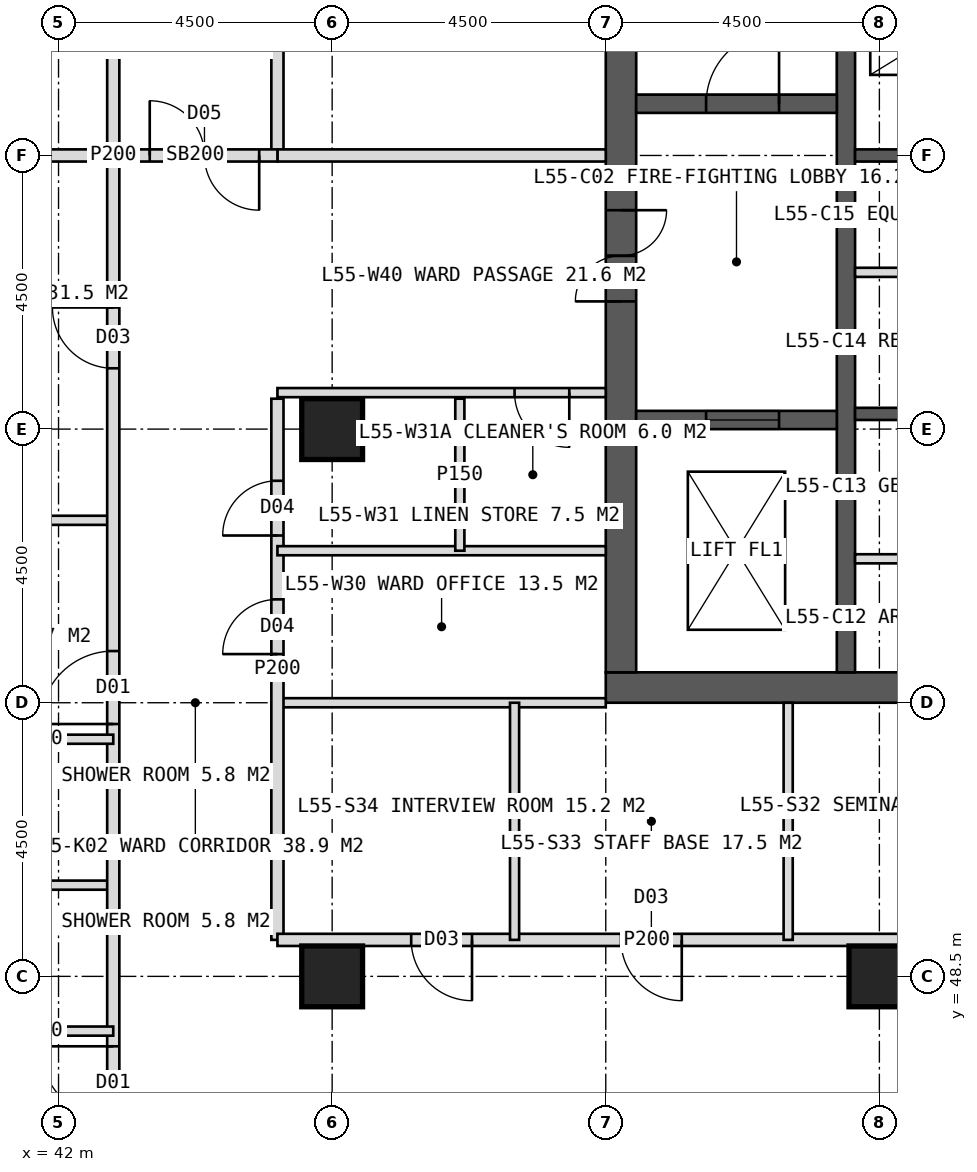
"""IFC4 building model, lengths in metres.
Left out: names, types, materials, properties, quantities, classifications, styles, units other than length and angle.
Written with IfcOpenShell. Run it as: python <this file> out.ifc"""

import sys

from ifc_helpers import new_model, si_unit, direction, frame, frame_2d, origin, origin_2d, place, context, subcontext, project, spatial, rectangle, hollow_rectangle, extrude, element, fill, save


model = new_model("IFC4")
c1 = context("Model", 3, precision=1e-05, world=origin(), true_north=direction((0.0, 1.0)))
c2 = subcontext(c1, "Body", "Model", "MODEL_VIEW")
j1 = project(units=[si_unit("LENGTHUNIT", "METRE"), si_unit("PLANEANGLEUNIT", "RADIAN")], contexts=[c1])
p1 = place(None, origin())
s1 = spatial("IfcSite", under=j1, at=p1, CompositionType="ELEMENT")
p2 = place(p1, origin())
s2 = spatial("IfcBuilding", under=s1, at=p2, CompositionType="ELEMENT")
p3 = place(p2, frame((0.0, 0.0, 229.0)))
s3 = spatial("IfcBuildingStorey", under=s2, at=p3, CompositionType="ELEMENT", Elevation=229.0)
p4 = place(p3, frame((51.0, 53.25, 0.0), z_axis=(0.0, 0.0, 1.0), x_axis=(1.0, 0.0, 0.0)))
e1 = element("IfcWall", 1, at=p4, inside=s3, PredefinedType="SHEAR", context=c2, shape_type="SweptSolid", body=[
    extrude(rectangle(XDim=18.0, YDim=0.5, at=frame_2d((9.0, 0.0))), origin(), (0.0, 0.0, 1.0), 4.0),
])
p5 = place(p4, frame((8.1, 0.0, 0.0)))
e2 = element("IfcOpeningElement", 2, at=p5, cuts=e1, PredefinedType="OPENING", context=c2, shape_type="SweptSolid", body=[
    extrude(rectangle(XDim=1.8, YDim=2.2, at=frame_2d((0.9, 1.1))), frame((0.0, 0.26, 0.0), z_axis=(0.0, -1.0, 0.0), x_axis=(1.0, 0.0, 0.0)), (0.0, 0.0, 1.0), 0.52),
])
p6 = place(p3, frame((51.25, 53.5, 0.0), z_axis=(0.0, 0.0, 1.0), x_axis=(0.0, 1.0, 0.0)))
e3 = element("IfcWall", 3, at=p6, inside=s3, PredefinedType="SHEAR", context=c2, shape_type="SweptSolid", body=[
    extrude(rectangle(XDim=17.0, YDim=0.5, at=frame_2d((8.5, 0.0))), origin(), (0.0, 0.0, 1.0), 4.0),
])
p7 = place(p6, frame((6.1, 0.0, 0.0)))
e4 = element("IfcOpeningElement", 4, at=p7, cuts=e3, PredefinedType="OPENING", context=c2, shape_type="SweptSolid", body=[
    extrude(rectangle(XDim=1.5, YDim=2.2, at=frame_2d((0.75, 1.1))), frame((0.0, 0.26, 0.0), z_axis=(0.0, -1.0, 0.0), x_axis=(1.0, 0.0, 0.0)), (0.0, 0.0, 1.0), 0.52),
])
p8 = place(p3, frame((54.95, 53.5, 0.0), z_axis=(0.0, 0.0, 1.0), x_axis=(0.0, 1.0, 0.0)))
e5 = element("IfcWall", 5, at=p8, inside=s3, PredefinedType="SHEAR", context=c2, shape_type="SweptSolid", body=[
    extrude(rectangle(XDim=17.0, YDim=0.3, at=frame_2d((8.5, 0.0))), origin(), (0.0, 0.0, 1.0), 4.0),
])
for number, where, z_axis, x_axis in (
    (6, (55.1, 57.75, 0.0), (0.0, 0.0, 1.0), (1.0, 0.0, 0.0)),
    (7, (55.1, 62.0, 0.0), (0.0, 0.0, 1.0), (1.0, 0.0, 0.0)),
):
    element("IfcWall", number, at=place(p3, frame(where, z_axis=z_axis, x_axis=x_axis)), inside=s3, PredefinedType="SHEAR", context=c2, shape_type="SweptSolid", body=[
        extrude(rectangle(XDim=3.05, YDim=0.2, at=frame_2d((1.525, 0.0))), origin(), (0.0, 0.0, 1.0), 4.0),
    ])
p9 = place(p3, frame((51.5, 62.85, 0.0), z_axis=(0.0, 0.0, 1.0), x_axis=(1.0, 0.0, 0.0)))
e8 = element("IfcWall", 8, at=p9, inside=s3, PredefinedType="SHEAR", context=c2, shape_type="SweptSolid", body=[
    extrude(rectangle(XDim=3.3, YDim=0.3, at=frame_2d((1.65, 0.0))), origin(), (0.0, 0.0, 1.0), 4.0),
])
p10 = place(p9, frame((1.15, 0.0, 0.0)))
e9 = element("IfcOpeningElement", 9, at=p10, cuts=e8, PredefinedType="OPENING", context=c2, shape_type="SweptSolid", body=[
    extrude(rectangle(XDim=1.2, YDim=2.1, at=frame_2d((0.6, 1.05))), frame((0.0, 0.16, 0.0), z_axis=(0.0, -1.0, 0.0), x_axis=(1.0, 0.0, 0.0)), (0.0, 0.0, 1.0), 0.32),
])
p11 = place(p3, frame((51.5, 57.65, 0.0), z_axis=(0.0, 0.0, 1.0), x_axis=(1.0, 0.0, 0.0)))
e10 = element("IfcWall", 10, at=p11, inside=s3, PredefinedType="SHEAR", context=c2, shape_type="SweptSolid", body=[
    extrude(rectangle(XDim=3.3, YDim=0.3, at=frame_2d((1.65, 0.0))), origin(), (0.0, 0.0, 1.0), 4.0),
])
p12 = place(p11, frame((1.15, 0.0, 0.0)))
e11 = element("IfcOpeningElement", 11, at=p12, cuts=e10, PredefinedType="OPENING", context=c2, shape_type="SweptSolid", body=[
    extrude(rectangle(XDim=1.2, YDim=2.2, at=frame_2d((0.6, 1.1))), frame((0.0, 0.16, 0.0), z_axis=(0.0, -1.0, 0.0), x_axis=(1.0, 0.0, 0.0)), (0.0, 0.0, 1.0), 0.32),
])
for number, where, z_axis, x_axis in (
    (12, (46.5, 48.5, 0.0), (0.0, 0.0, 1.0), (1.0, 0.0, 0.0)),
    (13, (55.5, 48.5, 0.0), (0.0, 0.0, 1.0), (1.0, 0.0, 0.0)),
    (14, (46.5, 57.5, 0.0), (0.0, 0.0, 1.0), (1.0, 0.0, 0.0)),
):
    element("IfcColumn", number, at=place(p3, frame(where, z_axis=z_axis, x_axis=x_axis)), inside=s3, PredefinedType="COLUMN", context=c2, shape_type="SweptSolid", body=[
        extrude(hollow_rectangle(XDim=1.0, YDim=1.0, WallThickness=0.1, at=origin_2d()), origin(), (0.0, 0.0, 1.0), 4.0),
    ])
for number, where, z_axis, x_axis in (
    (15, (42.9, 50.0, 0.0), (0.0, 0.0, 1.0), (-1.0, 0.0, 0.0)),
    (16, (42.9, 56.0, 0.0), (0.0, 0.0, 1.0), (-1.0, 0.0, 0.0)),
):
    element("IfcWall", number, at=place(p3, frame(where, z_axis=z_axis, x_axis=x_axis)), inside=s3, PredefinedType="PARTITIONING", context=c2, shape_type="SweptSolid", body=[
        extrude(rectangle(XDim=5.25, YDim=0.15, at=frame_2d((2.625, 0.0))), origin(), (0.0, 0.0, 1.0), 3.75),
    ])
p13 = place(p3, frame((42.9, 62.0, 0.0), z_axis=(0.0, 0.0, 1.0), x_axis=(-1.0, 0.0, 0.0)))
e17 = element("IfcWall", 17, at=p13, inside=s3, PredefinedType="SOLIDWALL", context=c2, shape_type="SweptSolid", body=[
    extrude(rectangle(XDim=5.25, YDim=0.2, at=frame_2d((2.625, 0.0))), origin(), (0.0, 0.0, 1.0), 2.95),
])
p14 = place(p3, frame((42.9, 44.9, 0.0), z_axis=(0.0, 0.0, 1.0), x_axis=(0.0, 1.0, 0.0)))
e18 = element("IfcWall", 18, at=p14, inside=s3, PredefinedType="PARTITIONING", context=c2, shape_type="SweptSolid", body=[
    extrude(rectangle(XDim=34.2, YDim=0.2, at=frame_2d((17.1, 0.0))), origin(), (0.0, 0.0, 1.0), 3.75),
])
p15 = place(p14, frame((1.25, 0.0, 0.0)))
e19 = element("IfcOpeningElement", 19, at=p15, cuts=e18, PredefinedType="OPENING", context=c2, shape_type="SweptSolid", body=[
    extrude(rectangle(XDim=1.2, YDim=2.2, at=frame_2d((0.6, 1.1))), frame((0.0, 0.11, 0.0), z_axis=(0.0, -1.0, 0.0), x_axis=(1.0, 0.0, 0.0)), (0.0, 0.0, 1.0), 0.22),
])
p16 = place(p14, frame((7.75, 0.0, 0.0)))
e20 = element("IfcOpeningElement", 20, at=p16, cuts=e18, PredefinedType="OPENING", context=c2, shape_type="SweptSolid", body=[
    extrude(rectangle(XDim=1.2, YDim=2.2, at=frame_2d((0.6, 1.1))), frame((0.0, 0.11, 0.0), z_axis=(0.0, -1.0, 0.0), x_axis=(1.0, 0.0, 0.0)), (0.0, 0.0, 1.0), 0.22),
])
p17 = place(p14, frame((13.6, 0.0, 0.0)))
e21 = element("IfcOpeningElement", 21, at=p17, cuts=e18, PredefinedType="OPENING", context=c2, shape_type="SweptSolid", body=[
    extrude(rectangle(XDim=1.0, YDim=2.1, at=frame_2d((0.5, 1.05))), frame((0.0, 0.11, 0.0), z_axis=(0.0, -1.0, 0.0), x_axis=(1.0, 0.0, 0.0)), (0.0, 0.0, 1.0), 0.22),
])
p18 = place(p14, frame((19.75, 0.0, 0.0)))
e22 = element("IfcOpeningElement", 22, at=p18, cuts=e18, PredefinedType="OPENING", context=c2, shape_type="SweptSolid", body=[
    extrude(rectangle(XDim=1.2, YDim=2.2, at=frame_2d((0.6, 1.1))), frame((0.0, 0.11, 0.0), z_axis=(0.0, -1.0, 0.0), x_axis=(1.0, 0.0, 0.0)), (0.0, 0.0, 1.0), 0.22),
])
p19 = place(p14, frame((30.35, 0.0, 0.0)))
e23 = element("IfcOpeningElement", 23, at=p19, cuts=e18, PredefinedType="OPENING", context=c2, shape_type="SweptSolid", body=[
    extrude(rectangle(XDim=1.2, YDim=2.2, at=frame_2d((0.6, 1.1))), frame((0.0, 0.11, 0.0), z_axis=(0.0, -1.0, 0.0), x_axis=(1.0, 0.0, 0.0)), (0.0, 0.0, 1.0), 0.22),
])
for number, where, z_axis, x_axis in (
    (24, (42.9, 47.6, 0.0), (0.0, 0.0, 1.0), (-1.0, 0.0, 0.0)),
    (25, (42.9, 52.4, 0.0), (0.0, 0.0, 1.0), (-1.0, 0.0, 0.0)),
):
    element("IfcWall", number, at=place(p3, frame(where, z_axis=z_axis, x_axis=x_axis)), inside=s3, PredefinedType="PARTITIONING", context=c2, shape_type="SweptSolid", body=[
        extrude(rectangle(XDim=2.4, YDim=0.15, at=frame_2d((1.2, 0.0))), origin(), (0.0, 0.0, 1.0), 3.75),
    ])
p20 = place(p3, frame((51.0, 53.0, 0.0), z_axis=(0.0, 0.0, 1.0), x_axis=(-1.0, 0.0, 0.0)))
e26 = element("IfcWall", 26, at=p20, inside=s3, PredefinedType="PARTITIONING", context=c2, shape_type="SweptSolid", body=[
    extrude(rectangle(XDim=5.4, YDim=0.15, at=frame_2d((2.7, 0.0))), origin(), (0.0, 0.0, 1.0), 3.75),
])
p21 = place(p3, frame((45.6, 49.1, 0.0), z_axis=(0.0, 0.0, 1.0), x_axis=(0.0, 1.0, 0.0)))
e27 = element("IfcWall", 27, at=p21, inside=s3, PredefinedType="PARTITIONING", context=c2, shape_type="SweptSolid", body=[
    extrude(rectangle(XDim=8.9, YDim=0.2, at=frame_2d((4.45, 0.0))), origin(), (0.0, 0.0, 1.0), 3.75),
])
p22 = place(p21, frame((4.7, 0.0, 0.0)))
e28 = element("IfcOpeningElement", 28, at=p22, cuts=e27, PredefinedType="OPENING", context=c2, shape_type="SweptSolid", body=[
    extrude(rectangle(XDim=0.9, YDim=2.1, at=frame_2d((0.45, 1.05))), frame((0.0, 0.11, 0.0), z_axis=(0.0, -1.0, 0.0), x_axis=(1.0, 0.0, 0.0)), (0.0, 0.0, 1.0), 0.22),
])
p23 = place(p21, frame((6.65, 0.0, 0.0)))
e29 = element("IfcOpeningElement", 29, at=p23, cuts=e27, PredefinedType="OPENING", context=c2, shape_type="SweptSolid", body=[
    extrude(rectangle(XDim=0.9, YDim=2.1, at=frame_2d((0.45, 1.05))), frame((0.0, 0.11, 0.0), z_axis=(0.0, -1.0, 0.0), x_axis=(1.0, 0.0, 0.0)), (0.0, 0.0, 1.0), 0.22),
])
p24 = place(p3, frame((45.6, 62.0, 0.0), z_axis=(0.0, 0.0, 1.0), x_axis=(0.0, 1.0, 0.0)))
e30 = element("IfcWall", 30, at=p24, inside=s3, PredefinedType="PARTITIONING", context=c2, shape_type="SweptSolid", body=[
    extrude(rectangle(XDim=14.4, YDim=0.2, at=frame_2d((7.2, 0.0))), origin(), (0.0, 0.0, 1.0), 3.75),
])
p25 = place(p24, frame((2.5, 0.0, 0.0)))
e31 = element("IfcOpeningElement", 31, at=p25, cuts=e30, PredefinedType="OPENING", context=c2, shape_type="SweptSolid", body=[
    extrude(rectangle(XDim=1.0, YDim=2.1, at=frame_2d((0.5, 1.05))), frame((0.0, 0.11, 0.0), z_axis=(0.0, -1.0, 0.0), x_axis=(1.0, 0.0, 0.0)), (0.0, 0.0, 1.0), 0.22),
])
p26 = place(p24, frame((7.0, 0.0, 0.0)))
e32 = element("IfcOpeningElement", 32, at=p26, cuts=e30, PredefinedType="OPENING", context=c2, shape_type="SweptSolid", body=[
    extrude(rectangle(XDim=1.0, YDim=2.1, at=frame_2d((0.5, 1.05))), frame((0.0, 0.11, 0.0), z_axis=(0.0, -1.0, 0.0), x_axis=(1.0, 0.0, 0.0)), (0.0, 0.0, 1.0), 0.22),
])
p27 = place(p24, frame((11.2, 0.0, 0.0)))
e33 = element("IfcOpeningElement", 33, at=p27, cuts=e30, PredefinedType="OPENING", context=c2, shape_type="SweptSolid", body=[
    extrude(rectangle(XDim=1.0, YDim=2.1, at=frame_2d((0.5, 1.05))), frame((0.0, 0.11, 0.0), z_axis=(0.0, -1.0, 0.0), x_axis=(1.0, 0.0, 0.0)), (0.0, 0.0, 1.0), 0.22),
])
p28 = place(p3, frame((51.0, 58.1, 0.0), z_axis=(0.0, 0.0, 1.0), x_axis=(-1.0, 0.0, 0.0)))
e34 = element("IfcWall", 34, at=p28, inside=s3, PredefinedType="PARTITIONING", context=c2, shape_type="SweptSolid", body=[
    extrude(rectangle(XDim=5.4, YDim=0.15, at=frame_2d((2.7, 0.0))), origin(), (0.0, 0.0, 1.0), 3.75),
])
p29 = place(p28, frame((0.6, 0.0, 0.0)))
e35 = element("IfcOpeningElement", 35, at=p29, cuts=e34, PredefinedType="OPENING", context=c2, shape_type="SweptSolid", body=[
    extrude(rectangle(XDim=0.9, YDim=2.1, at=frame_2d((0.45, 1.05))), frame((0.0, 0.085, 0.0), z_axis=(0.0, -1.0, 0.0), x_axis=(1.0, 0.0, 0.0)), (0.0, 0.0, 1.0), 0.17),
])
p30 = place(p3, frame((51.0, 62.0, 0.0), z_axis=(0.0, 0.0, 1.0), x_axis=(-1.0, 0.0, 0.0)))
e36 = element("IfcWall", 36, at=p30, inside=s3, PredefinedType="SOLIDWALL", context=c2, shape_type="SweptSolid", body=[
    extrude(rectangle(XDim=5.4, YDim=0.2, at=frame_2d((2.7, 0.0))), origin(), (0.0, 0.0, 1.0), 2.95),
])
p31 = place(p3, frame((51.0, 55.5, 0.0), z_axis=(0.0, 0.0, 1.0), x_axis=(-1.0, 0.0, 0.0)))
e37 = element("IfcWall", 37, at=p31, inside=s3, PredefinedType="PARTITIONING", context=c2, shape_type="SweptSolid", body=[
    extrude(rectangle(XDim=5.4, YDim=0.15, at=frame_2d((2.7, 0.0))), origin(), (0.0, 0.0, 1.0), 3.75),
])
p32 = place(p3, frame((48.6, 55.5, 0.0), z_axis=(0.0, 0.0, 1.0), x_axis=(0.0, 1.0, 0.0)))
e38 = element("IfcWall", 38, at=p32, inside=s3, PredefinedType="PARTITIONING", context=c2, shape_type="SweptSolid", body=[
    extrude(rectangle(XDim=2.5, YDim=0.15, at=frame_2d((1.25, 0.0))), origin(), (0.0, 0.0, 1.0), 3.75),
])
p33 = place(p3, frame((57.75, 49.1, 0.0), z_axis=(0.0, 0.0, 1.0), x_axis=(-1.0, 0.0, 0.0)))
e39 = element("IfcWall", 39, at=p33, inside=s3, PredefinedType="PARTITIONING", context=c2, shape_type="SweptSolid", body=[
    extrude(rectangle(XDim=12.15, YDim=0.2, at=frame_2d((6.075, 0.0))), origin(), (0.0, 0.0, 1.0), 3.75),
])
p34 = place(p33, frame((0.325, 0.0, 0.0)))
e40 = element("IfcOpeningElement", 40, at=p34, cuts=e39, PredefinedType="OPENING", context=c2, shape_type="SweptSolid", body=[
    extrude(rectangle(XDim=1.0, YDim=2.1, at=frame_2d((0.5, 1.05))), frame((0.0, 0.11, 0.0), z_axis=(0.0, -1.0, 0.0), x_axis=(1.0, 0.0, 0.0)), (0.0, 0.0, 1.0), 0.22),
])
p35 = place(p33, frame((5.5, 0.0, 0.0)))
e41 = element("IfcOpeningElement", 41, at=p35, cuts=e39, PredefinedType="OPENING", context=c2, shape_type="SweptSolid", body=[
    extrude(rectangle(XDim=1.0, YDim=2.1, at=frame_2d((0.5, 1.05))), frame((0.0, 0.11, 0.0), z_axis=(0.0, -1.0, 0.0), x_axis=(1.0, 0.0, 0.0)), (0.0, 0.0, 1.0), 0.22),
])
p36 = place(p33, frame((8.95, 0.0, 0.0)))
e42 = element("IfcOpeningElement", 42, at=p36, cuts=e39, PredefinedType="OPENING", context=c2, shape_type="SweptSolid", body=[
    extrude(rectangle(XDim=1.0, YDim=2.1, at=frame_2d((0.5, 1.05))), frame((0.0, 0.11, 0.0), z_axis=(0.0, -1.0, 0.0), x_axis=(1.0, 0.0, 0.0)), (0.0, 0.0, 1.0), 0.22),
])
for number, where, z_axis, x_axis in (
    (43, (54.0, 53.0, 0.0), (0.0, 0.0, 1.0), (0.0, -1.0, 0.0)),
    (44, (49.5, 53.0, 0.0), (0.0, 0.0, 1.0), (0.0, -1.0, 0.0)),
):
    element("IfcWall", number, at=place(p3, frame(where, z_axis=z_axis, x_axis=x_axis)), inside=s3, PredefinedType="PARTITIONING", context=c2, shape_type="SweptSolid", body=[
        extrude(rectangle(XDim=3.9, YDim=0.15, at=frame_2d((1.95, 0.0))), origin(), (0.0, 0.0, 1.0), 3.75),
    ])
p37 = place(p3, frame((45.6, 62.0, 0.0), z_axis=(0.0, 0.0, 1.0), x_axis=(-1.0, 0.0, 0.0)))
e45 = element("IfcWall", 45, at=p37, inside=s3, PredefinedType="SOLIDWALL", context=c2, shape_type="SweptSolid", body=[
    extrude(rectangle(XDim=2.7, YDim=0.2, at=frame_2d((1.35, 0.0))), origin(), (0.0, 0.0, 1.0), 2.95),
])
p38 = place(p37, frame((0.3, 0.0, 0.0)))
e46 = element("IfcOpeningElement", 46, at=p38, cuts=e45, PredefinedType="OPENING", context=c2, shape_type="SweptSolid", body=[
    extrude(rectangle(XDim=1.8, YDim=2.2, at=frame_2d((0.9, 1.1))), frame((0.0, 0.11, 0.0), z_axis=(0.0, -1.0, 0.0), x_axis=(1.0, 0.0, 0.0)), (0.0, 0.0, 1.0), 0.22),
])
for number, where, z_axis, x_axis in (
    (47, (55.1, 55.367, 0.0), (0.0, 0.0, 1.0), (1.0, 0.0, 0.0)),
    (48, (55.1, 60.078, 0.0), (0.0, 0.0, 1.0), (1.0, 0.0, 0.0)),
):
    element("IfcWall", number, at=place(p3, frame(where, z_axis=z_axis, x_axis=x_axis)), inside=s3, PredefinedType="PARTITIONING", context=c2, shape_type="SweptSolid", body=[
        extrude(rectangle(XDim=3.05, YDim=0.15, at=frame_2d((1.525, 0.0))), origin(), (0.0, 0.0, 1.0), 3.75),
    ])
p39 = place(p15, origin())
e49 = element("IfcDoor", 49, at=p39, inside=s3, OperationType="SINGLE_SWING_RIGHT", PredefinedType="DOOR", context=c2, shape_type="SweptSolid", body=[
    extrude(rectangle(XDim=1.2, YDim=2.2, at=frame_2d((0.6, 1.1))), frame((0.0, 0.025, 0.0), z_axis=(0.0, -1.0, 0.0), x_axis=(1.0, 0.0, 0.0)), (0.0, 0.0, 1.0), 0.05),
])
fill(e19, e49)
p40 = place(p16, origin())
e50 = element("IfcDoor", 50, at=p40, inside=s3, OperationType="SINGLE_SWING_LEFT", PredefinedType="DOOR", context=c2, shape_type="SweptSolid", body=[
    extrude(rectangle(XDim=1.2, YDim=2.2, at=frame_2d((0.6, 1.1))), frame((0.0, 0.025, 0.0), z_axis=(0.0, -1.0, 0.0), x_axis=(1.0, 0.0, 0.0)), (0.0, 0.0, 1.0), 0.05),
])
fill(e20, e50)
p41 = place(p17, origin())
e51 = element("IfcDoor", 51, at=p41, inside=s3, OperationType="SINGLE_SWING_RIGHT", PredefinedType="DOOR", context=c2, shape_type="SweptSolid", body=[
    extrude(rectangle(XDim=1.0, YDim=2.1, at=frame_2d((0.5, 1.05))), frame((0.0, 0.025, 0.0), z_axis=(0.0, -1.0, 0.0), x_axis=(1.0, 0.0, 0.0)), (0.0, 0.0, 1.0), 0.05),
])
fill(e21, e51)
p42 = place(p22, origin())
e52 = element("IfcDoor", 52, at=p42, inside=s3, OperationType="SINGLE_SWING_LEFT", PredefinedType="DOOR", context=c2, shape_type="SweptSolid", body=[
    extrude(rectangle(XDim=0.9, YDim=2.1, at=frame_2d((0.45, 1.05))), frame((0.0, 0.025, 0.0), z_axis=(0.0, -1.0, 0.0), x_axis=(1.0, 0.0, 0.0)), (0.0, 0.0, 1.0), 0.05),
])
fill(e28, e52)
p43 = place(p29, origin())
e53 = element("IfcDoor", 53, at=p43, inside=s3, OperationType="SINGLE_SWING_LEFT", PredefinedType="DOOR", context=c2, shape_type="SweptSolid", body=[
    extrude(rectangle(XDim=0.9, YDim=2.1, at=frame_2d((0.45, 1.05))), frame((0.0, 0.025, 0.0), z_axis=(0.0, -1.0, 0.0), x_axis=(1.0, 0.0, 0.0)), (0.0, 0.0, 1.0), 0.05),
])
fill(e35, e53)
p44 = place(p23, origin())
e54 = element("IfcDoor", 54, at=p44, inside=s3, OperationType="SINGLE_SWING_LEFT", PredefinedType="DOOR", context=c2, shape_type="SweptSolid", body=[
    extrude(rectangle(XDim=0.9, YDim=2.1, at=frame_2d((0.45, 1.05))), frame((0.0, 0.025, 0.0), z_axis=(0.0, -1.0, 0.0), x_axis=(1.0, 0.0, 0.0)), (0.0, 0.0, 1.0), 0.05),
])
fill(e29, e54)
p45 = place(p35, origin())
e55 = element("IfcDoor", 55, at=p45, inside=s3, OperationType="SINGLE_SWING_LEFT", PredefinedType="DOOR", context=c2, shape_type="SweptSolid", body=[
    extrude(rectangle(XDim=1.0, YDim=2.1, at=frame_2d((0.5, 1.05))), frame((0.0, 0.025, 0.0), z_axis=(0.0, -1.0, 0.0), x_axis=(1.0, 0.0, 0.0)), (0.0, 0.0, 1.0), 0.05),
])
fill(e41, e55)
p46 = place(p36, origin())
e56 = element("IfcDoor", 56, at=p46, inside=s3, OperationType="SINGLE_SWING_LEFT", PredefinedType="DOOR", context=c2, shape_type="SweptSolid", body=[
    extrude(rectangle(XDim=1.0, YDim=2.1, at=frame_2d((0.5, 1.05))), frame((0.0, 0.025, 0.0), z_axis=(0.0, -1.0, 0.0), x_axis=(1.0, 0.0, 0.0)), (0.0, 0.0, 1.0), 0.05),
])
fill(e42, e56)
p47 = place(p38, origin())
e57 = element("IfcDoor", 57, at=p47, inside=s3, OperationType="DOUBLE_DOOR_DOUBLE_SWING", PredefinedType="DOOR", context=c2, shape_type="SweptSolid", body=[
    extrude(rectangle(XDim=1.8, YDim=2.2, at=frame_2d((0.9, 1.1))), frame((0.0, 0.025, 0.0), z_axis=(0.0, -1.0, 0.0), x_axis=(1.0, 0.0, 0.0)), (0.0, 0.0, 1.0), 0.05),
])
fill(e46, e57)
p48 = place(p7, origin())
e58 = element("IfcDoor", 58, at=p48, inside=s3, OperationType="DOUBLE_DOOR_SINGLE_SWING", PredefinedType="DOOR", context=c2, shape_type="SweptSolid", body=[
    extrude(rectangle(XDim=1.5, YDim=2.2, at=frame_2d((0.75, 1.1))), frame((0.0, 0.025, 0.0), z_axis=(0.0, -1.0, 0.0), x_axis=(1.0, 0.0, 0.0)), (0.0, 0.0, 1.0), 0.05),
])
fill(e4, e58)
p49 = place(p10, origin())
e59 = element("IfcDoor", 59, at=p49, inside=s3, OperationType="SINGLE_SWING_RIGHT", PredefinedType="DOOR", context=c2, shape_type="SweptSolid", body=[
    extrude(rectangle(XDim=1.2, YDim=2.1, at=frame_2d((0.6, 1.05))), frame((0.0, 0.025, 0.0), z_axis=(0.0, -1.0, 0.0), x_axis=(1.0, 0.0, 0.0)), (0.0, 0.0, 1.0), 0.05),
])
fill(e9, e59)
p50 = place(p12, origin())
e60 = element("IfcDoor", 60, at=p50, inside=s3, OperationType="SLIDING_TO_LEFT", PredefinedType="DOOR", context=c2, shape_type="SweptSolid", body=[
    extrude(rectangle(XDim=1.2, YDim=2.2, at=frame_2d((0.6, 1.1))), frame((0.0, 0.025, 0.0), z_axis=(0.0, -1.0, 0.0), x_axis=(1.0, 0.0, 0.0)), (0.0, 0.0, 1.0), 0.05),
])
fill(e11, e60)
save(model, sys.argv[1])
